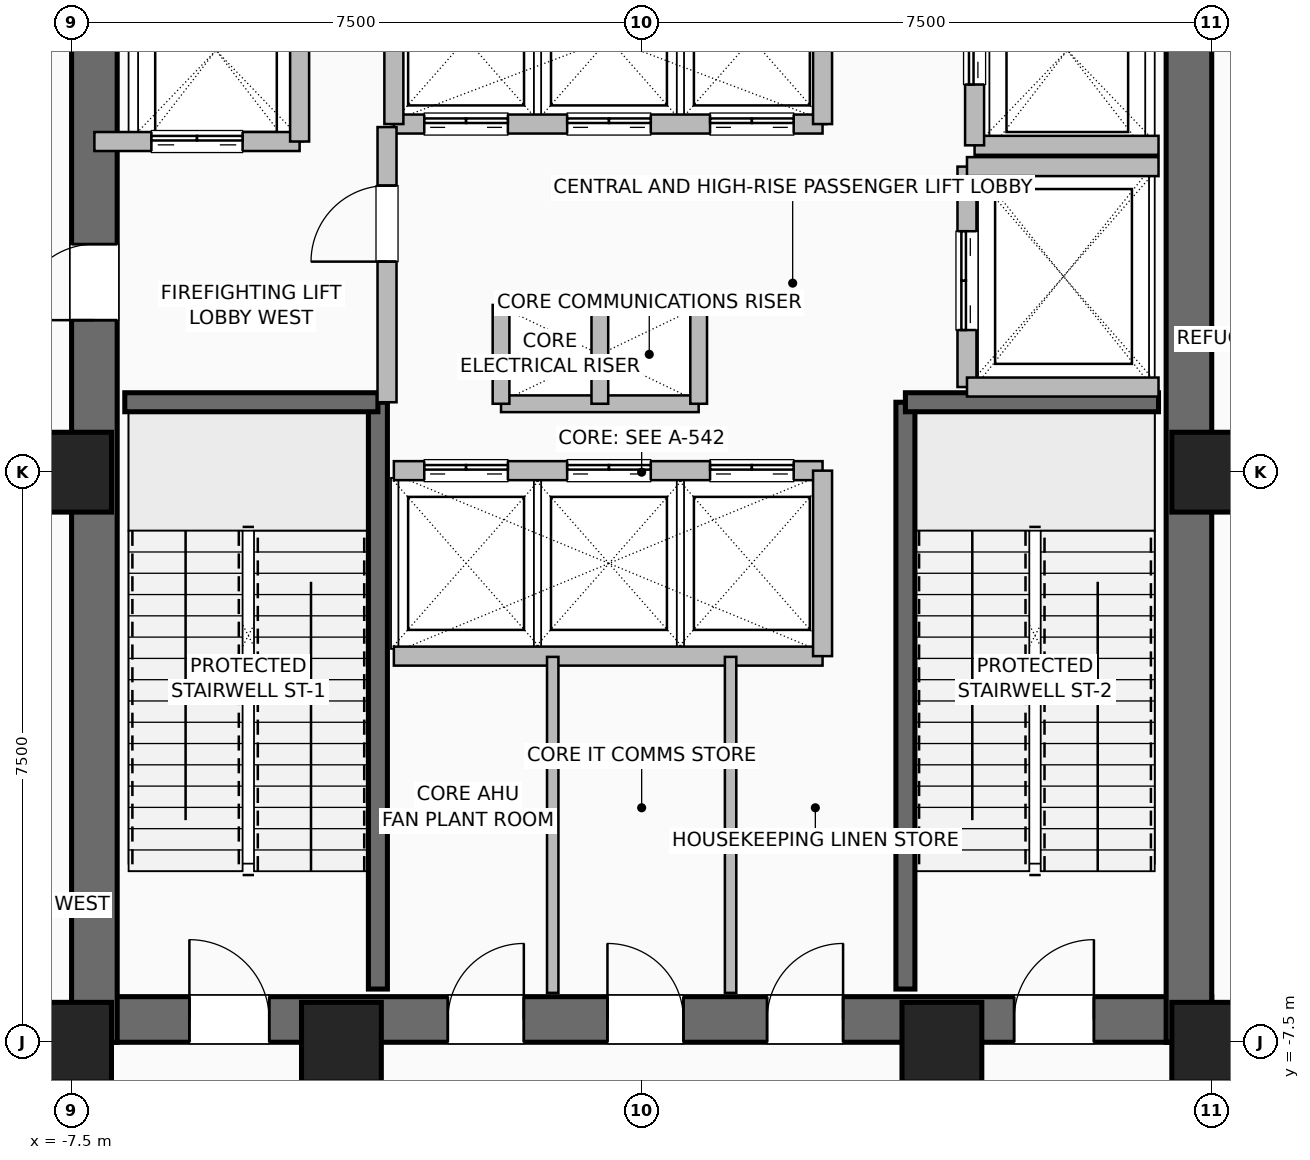
"""IFC4 building model, lengths in metres.
Left out: names, types, materials, properties, quantities, classifications, styles, units other than length and angle.
Written with IfcOpenShell. Run it as: python <this file> out.ifc"""

import sys

from ifc_helpers import new_model, si_unit, direction, frame, frame_2d, origin, origin_2d, place, context, subcontext, project, spatial, rectangle, hollow_rectangle, extrude, element, fill, save


model = new_model("IFC4")
c1 = context("Model", 3, precision=1e-05, world=origin(), true_north=direction((0.0, 1.0)))
c2 = subcontext(c1, "Body", "Model", "MODEL_VIEW")
j1 = project(units=[si_unit("LENGTHUNIT", "METRE"), si_unit("PLANEANGLEUNIT", "RADIAN")], contexts=[c1])
p1 = place(None, origin())
s1 = spatial("IfcSite", under=j1, at=p1, CompositionType="ELEMENT")
p2 = place(p1, origin())
s2 = spatial("IfcBuilding", under=s1, at=p2, CompositionType="ELEMENT")
p3 = place(p2, frame((0.0, 0.0, 160.2)))
s3 = spatial("IfcBuildingStorey", under=s2, at=p3, CompositionType="ELEMENT", Elevation=160.2)
for number, where, z_axis, x_axis in (
    (1, (-7.5, -7.5, 0.0), (0.0, 0.0, 1.0), (1.0, 0.0, 0.0)),
    (2, (-3.95, -7.5, 0.0), (0.0, 0.0, 1.0), (1.0, 0.0, 0.0)),
    (3, (3.95, -7.5, 0.0), (0.0, 0.0, 1.0), (1.0, 0.0, 0.0)),
    (4, (7.5, -7.5, 0.0), (0.0, 0.0, 1.0), (1.0, 0.0, 0.0)),
    (5, (7.5, 0.0, 0.0), (0.0, 0.0, 1.0), (1.0, 0.0, 0.0)),
    (6, (-7.5, 0.0, 0.0), (0.0, 0.0, 1.0), (1.0, 0.0, 0.0)),
):
    element("IfcColumn", number, at=place(p3, frame(where, z_axis=z_axis, x_axis=x_axis)), inside=s3, PredefinedType="COLUMN", context=c2, shape_type="SweptSolid", body=[
        extrude(hollow_rectangle(XDim=1.05, YDim=1.05, WallThickness=0.05, at=origin_2d()), origin(), (0.0, 0.0, 1.0), 6.0),
    ])
p4 = place(p3, frame((-7.5, -7.2, 0.0), z_axis=(0.0, 0.0, 1.0), x_axis=(1.0, 0.0, 0.0)))
e7 = element("IfcWall", 7, at=p4, inside=s3, PredefinedType="SHEAR", context=c2, shape_type="SweptSolid", body=[
    extrude(rectangle(XDim=15.0, YDim=0.6, at=frame_2d((7.5, 0.0))), origin(), (0.0, 0.0, 1.0), 5.6),
])
p5 = place(p4, frame((1.55, 0.0, 0.0)))
e8 = element("IfcOpeningElement", 8, at=p5, cuts=e7, PredefinedType="OPENING", context=c2, shape_type="SweptSolid", body=[
    extrude(rectangle(XDim=1.05, YDim=2.08, at=frame_2d((0.525, 1.04))), frame((0.0, 0.31, 0.0), z_axis=(0.0, -1.0, 0.0), x_axis=(1.0, 0.0, 0.0)), (0.0, 0.0, 1.0), 0.62),
])
p6 = place(p4, frame((12.4, 0.0, 0.0)))
e9 = element("IfcOpeningElement", 9, at=p6, cuts=e7, PredefinedType="OPENING", context=c2, shape_type="SweptSolid", body=[
    extrude(rectangle(XDim=1.05, YDim=2.08, at=frame_2d((0.525, 1.04))), frame((0.0, 0.31, 0.0), z_axis=(0.0, -1.0, 0.0), x_axis=(1.0, 0.0, 0.0)), (0.0, 0.0, 1.0), 0.62),
])
p7 = place(p4, frame((4.95, 0.0, 0.0)))
e10 = element("IfcOpeningElement", 10, at=p7, cuts=e7, PredefinedType="OPENING", context=c2, shape_type="SweptSolid", body=[
    extrude(rectangle(XDim=1.0, YDim=2.08, at=frame_2d((0.5, 1.04))), frame((0.0, 0.31, 0.0), z_axis=(0.0, -1.0, 0.0), x_axis=(1.0, 0.0, 0.0)), (0.0, 0.0, 1.0), 0.62),
])
p8 = place(p4, frame((7.05, 0.0, 0.0)))
e11 = element("IfcOpeningElement", 11, at=p8, cuts=e7, PredefinedType="OPENING", context=c2, shape_type="SweptSolid", body=[
    extrude(rectangle(XDim=1.0, YDim=2.08, at=frame_2d((0.5, 1.04))), frame((0.0, 0.31, 0.0), z_axis=(0.0, -1.0, 0.0), x_axis=(1.0, 0.0, 0.0)), (0.0, 0.0, 1.0), 0.62),
])
p9 = place(p4, frame((9.15, 0.0, 0.0)))
e12 = element("IfcOpeningElement", 12, at=p9, cuts=e7, PredefinedType="OPENING", context=c2, shape_type="SweptSolid", body=[
    extrude(rectangle(XDim=1.0, YDim=2.08, at=frame_2d((0.5, 1.04))), frame((0.0, 0.31, 0.0), z_axis=(0.0, -1.0, 0.0), x_axis=(1.0, 0.0, 0.0)), (0.0, 0.0, 1.0), 0.62),
])
p10 = place(p3, frame((-7.2, -7.5, 0.0), z_axis=(0.0, 0.0, 1.0), x_axis=(0.0, 1.0, 0.0)))
e13 = element("IfcWall", 13, at=p10, inside=s3, PredefinedType="SHEAR", context=c2, shape_type="SweptSolid", body=[
    extrude(rectangle(XDim=15.0, YDim=0.6, at=frame_2d((7.5, 0.0))), origin(), (0.0, 0.0, 1.0), 5.6),
])
p11 = place(p10, frame((9.5, 0.0, 0.0)))
e14 = element("IfcOpeningElement", 14, at=p11, cuts=e13, PredefinedType="OPENING", context=c2, shape_type="SweptSolid", body=[
    extrude(rectangle(XDim=1.0, YDim=2.08, at=frame_2d((0.5, 1.04))), frame((0.0, 0.31, 0.0), z_axis=(0.0, -1.0, 0.0), x_axis=(1.0, 0.0, 0.0)), (0.0, 0.0, 1.0), 0.62),
])
p12 = place(p3, frame((7.2, -7.5, 0.0), z_axis=(0.0, 0.0, 1.0), x_axis=(0.0, 1.0, 0.0)))
e15 = element("IfcWall", 15, at=p12, inside=s3, PredefinedType="SHEAR", context=c2, shape_type="SweptSolid", body=[
    extrude(rectangle(XDim=15.0, YDim=0.6, at=frame_2d((7.5, 0.0))), origin(), (0.0, 0.0, 1.0), 5.6),
])
p13 = place(p3, frame((-3.47, -6.8, 0.0), z_axis=(0.0, 0.0, 1.0), x_axis=(0.0, 1.0, 0.0)))
e16 = element("IfcWall", 16, at=p13, inside=s3, PredefinedType="SHEAR", context=c2, shape_type="SweptSolid", body=[
    extrude(rectangle(XDim=7.72, YDim=0.25, at=frame_2d((3.86, 0.0))), origin(), (0.0, 0.0, 1.0), 5.6),
])
p14 = place(p3, frame((-6.8, 0.92, 0.0), z_axis=(0.0, 0.0, 1.0), x_axis=(1.0, 0.0, 0.0)))
e17 = element("IfcWall", 17, at=p14, inside=s3, PredefinedType="SHEAR", context=c2, shape_type="SweptSolid", body=[
    extrude(rectangle(XDim=3.33, YDim=0.25, at=frame_2d((1.665, 0.0))), origin(), (0.0, 0.0, 1.0), 5.6),
])
p15 = place(p3, frame((3.47, -6.8, 0.0), z_axis=(0.0, 0.0, 1.0), x_axis=(0.0, 1.0, 0.0)))
e18 = element("IfcWall", 18, at=p15, inside=s3, PredefinedType="SHEAR", context=c2, shape_type="SweptSolid", body=[
    extrude(rectangle(XDim=7.72, YDim=0.25, at=frame_2d((3.86, 0.0))), origin(), (0.0, 0.0, 1.0), 5.6),
])
p16 = place(p3, frame((3.47, 0.92, 0.0), z_axis=(0.0, 0.0, 1.0), x_axis=(1.0, 0.0, 0.0)))
e19 = element("IfcWall", 19, at=p16, inside=s3, PredefinedType="SHEAR", context=c2, shape_type="SweptSolid", body=[
    extrude(rectangle(XDim=3.33, YDim=0.25, at=frame_2d((1.665, 0.0))), origin(), (0.0, 0.0, 1.0), 5.6),
])
for number, where, z_axis, x_axis in (
    (20, (-1.85, 2.2, 0.0), (0.0, 0.0, 1.0), (1.0, 0.0, 0.0)),
    (21, (-1.85, 0.9, 0.0), (0.0, 0.0, 1.0), (1.0, 0.0, 0.0)),
):
    element("IfcWall", number, at=place(p3, frame(where, z_axis=z_axis, x_axis=x_axis)), inside=s3, PredefinedType="PARTITIONING", context=c2, shape_type="SweptSolid", body=[
        extrude(rectangle(XDim=2.6, YDim=0.22, at=frame_2d((1.3, 0.0))), origin(), (0.0, 0.0, 1.0), 5.6),
    ])
for number, where, z_axis, x_axis in (
    (22, (-0.55, 0.9, 0.0), (0.0, 0.0, 1.0), (0.0, 1.0, 0.0)),
    (23, (0.75, 0.9, 0.0), (0.0, 0.0, 1.0), (0.0, 1.0, 0.0)),
    (24, (-1.85, 0.9, 0.0), (0.0, 0.0, 1.0), (0.0, 1.0, 0.0)),
):
    element("IfcWall", number, at=place(p3, frame(where, z_axis=z_axis, x_axis=x_axis)), inside=s3, PredefinedType="PARTITIONING", context=c2, shape_type="SweptSolid", body=[
        extrude(rectangle(XDim=1.3, YDim=0.22, at=frame_2d((0.65, 0.0))), origin(), (0.0, 0.0, 1.0), 5.6),
    ])
p17 = place(p3, frame((-3.26, 0.02, 0.0), z_axis=(0.0, 0.0, 1.0), x_axis=(1.0, 0.0, 0.0)))
e25 = element("IfcWall", 25, at=p17, inside=s3, PredefinedType="SHEAR", context=c2, shape_type="SweptSolid", body=[
    extrude(rectangle(XDim=5.64, YDim=0.25, at=frame_2d((2.82, 0.0))), origin(), (0.0, 0.0, 1.0), 5.6),
])
p18 = place(p17, frame((0.4, 0.0, 0.0)))
e26 = element("IfcOpeningElement", 26, at=p18, cuts=e25, PredefinedType="OPENING", context=c2, shape_type="SweptSolid", body=[
    extrude(rectangle(XDim=1.1, YDim=2.2, at=frame_2d((0.55, 1.1))), frame((0.0, 0.135, 0.0), z_axis=(0.0, -1.0, 0.0), x_axis=(1.0, 0.0, 0.0)), (0.0, 0.0, 1.0), 0.27),
])
p19 = place(p17, frame((2.28, 0.0, 0.0)))
e27 = element("IfcOpeningElement", 27, at=p19, cuts=e25, PredefinedType="OPENING", context=c2, shape_type="SweptSolid", body=[
    extrude(rectangle(XDim=1.1, YDim=2.2, at=frame_2d((0.55, 1.1))), frame((0.0, 0.135, 0.0), z_axis=(0.0, -1.0, 0.0), x_axis=(1.0, 0.0, 0.0)), (0.0, 0.0, 1.0), 0.27),
])
p20 = place(p17, frame((4.16, 0.0, 0.0)))
e28 = element("IfcOpeningElement", 28, at=p20, cuts=e25, PredefinedType="OPENING", context=c2, shape_type="SweptSolid", body=[
    extrude(rectangle(XDim=1.1, YDim=2.2, at=frame_2d((0.55, 1.1))), frame((0.0, 0.135, 0.0), z_axis=(0.0, -1.0, 0.0), x_axis=(1.0, 0.0, 0.0)), (0.0, 0.0, 1.0), 0.27),
])
p21 = place(p3, frame((-3.26, -2.42, 0.0), z_axis=(0.0, 0.0, 1.0), x_axis=(1.0, 0.0, 0.0)))
e29 = element("IfcWall", 29, at=p21, inside=s3, PredefinedType="SHEAR", context=c2, shape_type="SweptSolid", body=[
    extrude(rectangle(XDim=5.64, YDim=0.25, at=frame_2d((2.82, 0.0))), origin(), (0.0, 0.0, 1.0), 5.6),
])
p22 = place(p3, frame((2.38, -2.42, 0.0), z_axis=(0.0, 0.0, 1.0), x_axis=(0.0, 1.0, 0.0)))
e30 = element("IfcWall", 30, at=p22, inside=s3, PredefinedType="SHEAR", context=c2, shape_type="SweptSolid", body=[
    extrude(rectangle(XDim=2.44, YDim=0.25, at=frame_2d((1.22, 0.0))), origin(), (0.0, 0.0, 1.0), 5.6),
])
p23 = place(p3, frame((-3.26, 4.58, 0.0), z_axis=(0.0, 0.0, 1.0), x_axis=(1.0, 0.0, 0.0)))
e31 = element("IfcWall", 31, at=p23, inside=s3, PredefinedType="SHEAR", context=c2, shape_type="SweptSolid", body=[
    extrude(rectangle(XDim=5.64, YDim=0.25, at=frame_2d((2.82, 0.0))), origin(), (0.0, 0.0, 1.0), 5.6),
])
p24 = place(p23, frame((0.4, 0.0, 0.0)))
e32 = element("IfcOpeningElement", 32, at=p24, cuts=e31, PredefinedType="OPENING", context=c2, shape_type="SweptSolid", body=[
    extrude(rectangle(XDim=1.1, YDim=2.2, at=frame_2d((0.55, 1.1))), frame((0.0, 0.135, 0.0), z_axis=(0.0, -1.0, 0.0), x_axis=(1.0, 0.0, 0.0)), (0.0, 0.0, 1.0), 0.27),
])
p25 = place(p23, frame((2.28, 0.0, 0.0)))
e33 = element("IfcOpeningElement", 33, at=p25, cuts=e31, PredefinedType="OPENING", context=c2, shape_type="SweptSolid", body=[
    extrude(rectangle(XDim=1.1, YDim=2.2, at=frame_2d((0.55, 1.1))), frame((0.0, 0.135, 0.0), z_axis=(0.0, -1.0, 0.0), x_axis=(1.0, 0.0, 0.0)), (0.0, 0.0, 1.0), 0.27),
])
p26 = place(p23, frame((4.16, 0.0, 0.0)))
e34 = element("IfcOpeningElement", 34, at=p26, cuts=e31, PredefinedType="OPENING", context=c2, shape_type="SweptSolid", body=[
    extrude(rectangle(XDim=1.1, YDim=2.2, at=frame_2d((0.55, 1.1))), frame((0.0, 0.135, 0.0), z_axis=(0.0, -1.0, 0.0), x_axis=(1.0, 0.0, 0.0)), (0.0, 0.0, 1.0), 0.27),
])
for number, where, z_axis, x_axis in (
    (35, (-3.26, 4.58, 0.0), (0.0, 0.0, 1.0), (0.0, 1.0, 0.0)),
    (36, (2.38, 4.58, 0.0), (0.0, 0.0, 1.0), (0.0, 1.0, 0.0)),
):
    element("IfcWall", number, at=place(p3, frame(where, z_axis=z_axis, x_axis=x_axis)), inside=s3, PredefinedType="SHEAR", context=c2, shape_type="SweptSolid", body=[
        extrude(rectangle(XDim=2.22, YDim=0.25, at=frame_2d((1.11, 0.0))), origin(), (0.0, 0.0, 1.0), 5.6),
    ])
p27 = place(p3, frame((-7.2, 4.35, 0.0), z_axis=(0.0, 0.0, 1.0), x_axis=(1.0, 0.0, 0.0)))
e37 = element("IfcWall", 37, at=p27, inside=s3, PredefinedType="SHEAR", context=c2, shape_type="SweptSolid", body=[
    extrude(rectangle(XDim=2.7, YDim=0.25, at=frame_2d((1.35, 0.0))), origin(), (0.0, 0.0, 1.0), 5.6),
])
p28 = place(p27, frame((0.75, 0.0, 0.0)))
e38 = element("IfcOpeningElement", 38, at=p28, cuts=e37, PredefinedType="OPENING", context=c2, shape_type="SweptSolid", body=[
    extrude(rectangle(XDim=1.2, YDim=2.2, at=frame_2d((0.6, 1.1))), frame((0.0, 0.135, 0.0), z_axis=(0.0, -1.0, 0.0), x_axis=(1.0, 0.0, 0.0)), (0.0, 0.0, 1.0), 0.27),
])
p29 = place(p3, frame((-4.5, 4.35, 0.0), z_axis=(0.0, 0.0, 1.0), x_axis=(0.0, 1.0, 0.0)))
e39 = element("IfcWall", 39, at=p29, inside=s3, PredefinedType="SHEAR", context=c2, shape_type="SweptSolid", body=[
    extrude(rectangle(XDim=2.85, YDim=0.25, at=frame_2d((1.425, 0.0))), origin(), (0.0, 0.0, 1.0), 5.6),
])
p30 = place(p3, frame((4.38, 4.3, 0.0), z_axis=(0.0, 0.0, 1.0), x_axis=(1.0, 0.0, 0.0)))
e40 = element("IfcWall", 40, at=p30, inside=s3, PredefinedType="SHEAR", context=c2, shape_type="SweptSolid", body=[
    extrude(rectangle(XDim=2.42, YDim=0.25, at=frame_2d((1.21, 0.0))), origin(), (0.0, 0.0, 1.0), 5.6),
])
p31 = place(p3, frame((4.38, 4.3, 0.0), z_axis=(0.0, 0.0, 1.0), x_axis=(0.0, 1.0, 0.0)))
e41 = element("IfcWall", 41, at=p31, inside=s3, PredefinedType="SHEAR", context=c2, shape_type="SweptSolid", body=[
    extrude(rectangle(XDim=2.5, YDim=0.25, at=frame_2d((1.25, 0.0))), origin(), (0.0, 0.0, 1.0), 5.6),
])
p32 = place(p31, frame((0.8, 0.0, 0.0)))
e42 = element("IfcOpeningElement", 42, at=p32, cuts=e41, PredefinedType="OPENING", context=c2, shape_type="SweptSolid", body=[
    extrude(rectangle(XDim=1.2, YDim=2.2, at=frame_2d((0.6, 1.1))), frame((0.0, 0.135, 0.0), z_axis=(0.0, -1.0, 0.0), x_axis=(1.0, 0.0, 0.0)), (0.0, 0.0, 1.0), 0.27),
])
p33 = place(p3, frame((4.28, 1.12, 0.0), z_axis=(0.0, 0.0, 1.0), x_axis=(0.0, 1.0, 0.0)))
e43 = element("IfcWall", 43, at=p33, inside=s3, PredefinedType="SHEAR", context=c2, shape_type="SweptSolid", body=[
    extrude(rectangle(XDim=2.9, YDim=0.25, at=frame_2d((1.45, 0.0))), origin(), (0.0, 0.0, 1.0), 5.6),
])
p34 = place(p33, frame((0.75, 0.0, 0.0)))
e44 = element("IfcOpeningElement", 44, at=p34, cuts=e43, PredefinedType="OPENING", context=c2, shape_type="SweptSolid", body=[
    extrude(rectangle(XDim=1.3, YDim=2.3, at=frame_2d((0.65, 1.15))), frame((0.0, 0.135, 0.0), z_axis=(0.0, -1.0, 0.0), x_axis=(1.0, 0.0, 0.0)), (0.0, 0.0, 1.0), 0.27),
])
for number, where, z_axis, x_axis in (
    (45, (4.28, 1.12, 0.0), (0.0, 0.0, 1.0), (1.0, 0.0, 0.0)),
    (46, (4.28, 4.02, 0.0), (0.0, 0.0, 1.0), (1.0, 0.0, 0.0)),
):
    element("IfcWall", number, at=place(p3, frame(where, z_axis=z_axis, x_axis=x_axis)), inside=s3, PredefinedType="SHEAR", context=c2, shape_type="SweptSolid", body=[
        extrude(rectangle(XDim=2.52, YDim=0.25, at=frame_2d((1.26, 0.0))), origin(), (0.0, 0.0, 1.0), 5.6),
    ])
p35 = place(p3, frame((-3.35, 0.92, 0.0), z_axis=(0.0, 0.0, 1.0), x_axis=(0.0, 1.0, 0.0)))
e47 = element("IfcWall", 47, at=p35, inside=s3, PredefinedType="SHEAR", context=c2, shape_type="SweptSolid", body=[
    extrude(rectangle(XDim=3.62, YDim=0.25, at=frame_2d((1.81, 0.0))), origin(), (0.0, 0.0, 1.0), 5.6),
])
p36 = place(p35, frame((1.85, 0.0, 0.0)))
e48 = element("IfcOpeningElement", 48, at=p36, cuts=e47, PredefinedType="OPENING", context=c2, shape_type="SweptSolid", body=[
    extrude(rectangle(XDim=1.0, YDim=2.08, at=frame_2d((0.5, 1.04))), frame((0.0, 0.135, 0.0), z_axis=(0.0, -1.0, 0.0), x_axis=(1.0, 0.0, 0.0)), (0.0, 0.0, 1.0), 0.27),
])
for number, where, z_axis, x_axis in (
    (49, (-1.17, -6.85, 0.0), (0.0, 0.0, 1.0), (0.0, 1.0, 0.0)),
    (50, (1.17, -6.85, 0.0), (0.0, 0.0, 1.0), (0.0, 1.0, 0.0)),
):
    element("IfcWall", number, at=place(p3, frame(where, z_axis=z_axis, x_axis=x_axis)), inside=s3, PredefinedType="PARTITIONING", context=c2, shape_type="SweptSolid", body=[
        extrude(rectangle(XDim=4.42, YDim=0.15, at=frame_2d((2.21, 0.0))), origin(), (0.0, 0.0, 1.0), 5.6),
    ])
p37 = place(p5, origin())
e51 = element("IfcDoor", 51, at=p37, inside=s3, OperationType="SINGLE_SWING_LEFT", PredefinedType="DOOR", context=c2, shape_type="SweptSolid", body=[
    extrude(rectangle(XDim=1.05, YDim=2.08, at=frame_2d((0.525, 1.04))), frame((0.0, 0.025, 0.0), z_axis=(0.0, -1.0, 0.0), x_axis=(1.0, 0.0, 0.0)), (0.0, 0.0, 1.0), 0.05),
])
fill(e8, e51)
p38 = place(p6, origin())
e52 = element("IfcDoor", 52, at=p38, inside=s3, OperationType="SINGLE_SWING_RIGHT", PredefinedType="DOOR", context=c2, shape_type="SweptSolid", body=[
    extrude(rectangle(XDim=1.05, YDim=2.08, at=frame_2d((0.525, 1.04))), frame((0.0, 0.025, 0.0), z_axis=(0.0, -1.0, 0.0), x_axis=(1.0, 0.0, 0.0)), (0.0, 0.0, 1.0), 0.05),
])
fill(e9, e52)
p39 = place(p11, origin())
e53 = element("IfcDoor", 53, at=p39, inside=s3, OperationType="SINGLE_SWING_LEFT", PredefinedType="DOOR", context=c2, shape_type="SweptSolid", body=[
    extrude(rectangle(XDim=1.0, YDim=2.08, at=frame_2d((0.5, 1.04))), frame((0.0, 0.025, 0.0), z_axis=(0.0, -1.0, 0.0), x_axis=(1.0, 0.0, 0.0)), (0.0, 0.0, 1.0), 0.05),
])
fill(e14, e53)
p40 = place(p7, origin())
e54 = element("IfcDoor", 54, at=p40, inside=s3, OperationType="SINGLE_SWING_RIGHT", PredefinedType="DOOR", context=c2, shape_type="SweptSolid", body=[
    extrude(rectangle(XDim=1.0, YDim=2.08, at=frame_2d((0.5, 1.04))), frame((0.0, 0.025, 0.0), z_axis=(0.0, -1.0, 0.0), x_axis=(1.0, 0.0, 0.0)), (0.0, 0.0, 1.0), 0.05),
])
fill(e10, e54)
p41 = place(p8, origin())
e55 = element("IfcDoor", 55, at=p41, inside=s3, OperationType="SINGLE_SWING_LEFT", PredefinedType="DOOR", context=c2, shape_type="SweptSolid", body=[
    extrude(rectangle(XDim=1.0, YDim=2.08, at=frame_2d((0.5, 1.04))), frame((0.0, 0.025, 0.0), z_axis=(0.0, -1.0, 0.0), x_axis=(1.0, 0.0, 0.0)), (0.0, 0.0, 1.0), 0.05),
])
fill(e11, e55)
p42 = place(p9, origin())
e56 = element("IfcDoor", 56, at=p42, inside=s3, OperationType="SINGLE_SWING_RIGHT", PredefinedType="DOOR", context=c2, shape_type="SweptSolid", body=[
    extrude(rectangle(XDim=1.0, YDim=2.08, at=frame_2d((0.5, 1.04))), frame((0.0, 0.025, 0.0), z_axis=(0.0, -1.0, 0.0), x_axis=(1.0, 0.0, 0.0)), (0.0, 0.0, 1.0), 0.05),
])
fill(e12, e56)
p43 = place(p18, origin())
e57 = element("IfcDoor", 57, at=p43, inside=s3, OperationType="DOUBLE_DOOR_SLIDING", PredefinedType="DOOR", context=c2, shape_type="SweptSolid", body=[
    extrude(rectangle(XDim=1.1, YDim=2.2, at=frame_2d((0.55, 1.1))), frame((0.0, 0.025, 0.0), z_axis=(0.0, -1.0, 0.0), x_axis=(1.0, 0.0, 0.0)), (0.0, 0.0, 1.0), 0.05),
])
fill(e26, e57)
p44 = place(p19, origin())
e58 = element("IfcDoor", 58, at=p44, inside=s3, OperationType="DOUBLE_DOOR_SLIDING", PredefinedType="DOOR", context=c2, shape_type="SweptSolid", body=[
    extrude(rectangle(XDim=1.1, YDim=2.2, at=frame_2d((0.55, 1.1))), frame((0.0, 0.025, 0.0), z_axis=(0.0, -1.0, 0.0), x_axis=(1.0, 0.0, 0.0)), (0.0, 0.0, 1.0), 0.05),
])
fill(e27, e58)
p45 = place(p20, origin())
e59 = element("IfcDoor", 59, at=p45, inside=s3, OperationType="DOUBLE_DOOR_SLIDING", PredefinedType="DOOR", context=c2, shape_type="SweptSolid", body=[
    extrude(rectangle(XDim=1.1, YDim=2.2, at=frame_2d((0.55, 1.1))), frame((0.0, 0.025, 0.0), z_axis=(0.0, -1.0, 0.0), x_axis=(1.0, 0.0, 0.0)), (0.0, 0.0, 1.0), 0.05),
])
fill(e28, e59)
p46 = place(p24, origin())
e60 = element("IfcDoor", 60, at=p46, inside=s3, OperationType="DOUBLE_DOOR_SLIDING", PredefinedType="DOOR", context=c2, shape_type="SweptSolid", body=[
    extrude(rectangle(XDim=1.1, YDim=2.2, at=frame_2d((0.55, 1.1))), frame((0.0, 0.025, 0.0), z_axis=(0.0, -1.0, 0.0), x_axis=(1.0, 0.0, 0.0)), (0.0, 0.0, 1.0), 0.05),
])
fill(e32, e60)
p47 = place(p25, origin())
e61 = element("IfcDoor", 61, at=p47, inside=s3, OperationType="DOUBLE_DOOR_SLIDING", PredefinedType="DOOR", context=c2, shape_type="SweptSolid", body=[
    extrude(rectangle(XDim=1.1, YDim=2.2, at=frame_2d((0.55, 1.1))), frame((0.0, 0.025, 0.0), z_axis=(0.0, -1.0, 0.0), x_axis=(1.0, 0.0, 0.0)), (0.0, 0.0, 1.0), 0.05),
])
fill(e33, e61)
p48 = place(p26, origin())
e62 = element("IfcDoor", 62, at=p48, inside=s3, OperationType="DOUBLE_DOOR_SLIDING", PredefinedType="DOOR", context=c2, shape_type="SweptSolid", body=[
    extrude(rectangle(XDim=1.1, YDim=2.2, at=frame_2d((0.55, 1.1))), frame((0.0, 0.025, 0.0), z_axis=(0.0, -1.0, 0.0), x_axis=(1.0, 0.0, 0.0)), (0.0, 0.0, 1.0), 0.05),
])
fill(e34, e62)
p49 = place(p28, origin())
e63 = element("IfcDoor", 63, at=p49, inside=s3, OperationType="DOUBLE_DOOR_SLIDING", PredefinedType="DOOR", context=c2, shape_type="SweptSolid", body=[
    extrude(rectangle(XDim=1.2, YDim=2.2, at=frame_2d((0.6, 1.1))), frame((0.0, 0.025, 0.0), z_axis=(0.0, -1.0, 0.0), x_axis=(1.0, 0.0, 0.0)), (0.0, 0.0, 1.0), 0.05),
])
fill(e38, e63)
p50 = place(p32, origin())
e64 = element("IfcDoor", 64, at=p50, inside=s3, OperationType="DOUBLE_DOOR_SLIDING", PredefinedType="DOOR", context=c2, shape_type="SweptSolid", body=[
    extrude(rectangle(XDim=1.2, YDim=2.2, at=frame_2d((0.6, 1.1))), frame((0.0, 0.025, 0.0), z_axis=(0.0, -1.0, 0.0), x_axis=(1.0, 0.0, 0.0)), (0.0, 0.0, 1.0), 0.05),
])
fill(e42, e64)
p51 = place(p34, origin())
e65 = element("IfcDoor", 65, at=p51, inside=s3, OperationType="DOUBLE_DOOR_SLIDING", PredefinedType="DOOR", context=c2, shape_type="SweptSolid", body=[
    extrude(rectangle(XDim=1.3, YDim=2.3, at=frame_2d((0.65, 1.15))), frame((0.0, 0.025, 0.0), z_axis=(0.0, -1.0, 0.0), x_axis=(1.0, 0.0, 0.0)), (0.0, 0.0, 1.0), 0.05),
])
fill(e44, e65)
p52 = place(p36, origin())
e66 = element("IfcDoor", 66, at=p52, inside=s3, OperationType="SINGLE_SWING_LEFT", PredefinedType="DOOR", context=c2, shape_type="SweptSolid", body=[
    extrude(rectangle(XDim=1.0, YDim=2.08, at=frame_2d((0.5, 1.04))), frame((0.0, 0.025, 0.0), z_axis=(0.0, -1.0, 0.0), x_axis=(1.0, 0.0, 0.0)), (0.0, 0.0, 1.0), 0.05),
])
fill(e48, e66)
save(model, sys.argv[1])
